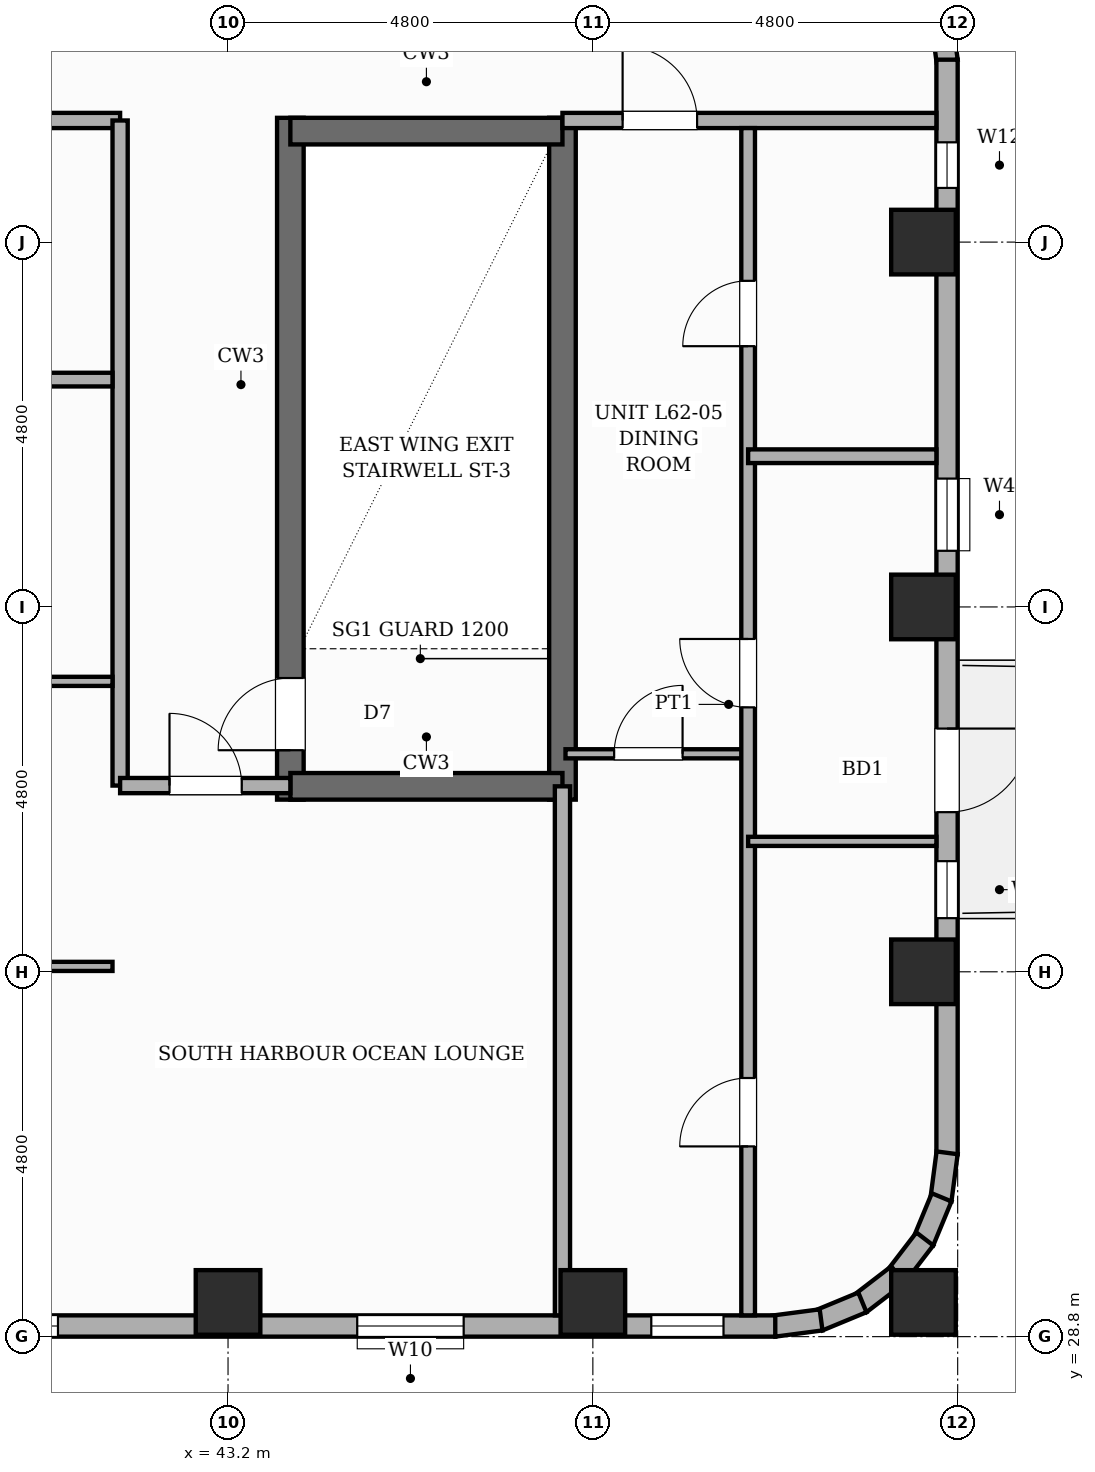
"""IFC4 building model, lengths in metres.
Left out: names, types, materials, properties, quantities, classifications, styles, units other than length and angle.
Written with IfcOpenShell. Run it as: python <this file> out.ifc"""

import sys

from ifc_helpers import new_model, si_unit, direction, frame, frame_2d, origin, origin_2d, place, context, subcontext, project, spatial, rectangle, extrude, element, fill, save


model = new_model("IFC4")
c1 = context("Model", 3, precision=1e-05, world=origin(), true_north=direction((0.0, 1.0)))
c2 = subcontext(c1, "Body", "Model", "MODEL_VIEW")
j1 = project(units=[si_unit("LENGTHUNIT", "METRE"), si_unit("PLANEANGLEUNIT", "RADIAN")], contexts=[c1])
p1 = place(None, origin())
s1 = spatial("IfcSite", under=j1, at=p1, CompositionType="ELEMENT")
p2 = place(p1, origin())
s2 = spatial("IfcBuilding", under=s1, at=p2, CompositionType="ELEMENT")
p3 = place(p2, frame((0.0, 0.0, 236.2)))
s3 = spatial("IfcBuildingStorey", under=s2, at=p3, CompositionType="ELEMENT", Elevation=236.2)
p4 = place(p3, frame((44.02, 35.865, 0.0), z_axis=(0.0, 0.0, 1.0), x_axis=(0.0, 1.0, 0.0)))
e1 = element("IfcWall", 1, at=p4, inside=s3, PredefinedType="SHEAR", context=c2, shape_type="SweptSolid", body=[
    extrude(rectangle(XDim=8.97, YDim=0.35, at=frame_2d((4.485, 0.0))), origin(), (0.0, 0.0, 1.0), 3.6),
])
p5 = place(p4, frame((0.65, 0.0, 0.0)))
e2 = element("IfcOpeningElement", 2, at=p5, cuts=e1, PredefinedType="OPENING", context=c2, shape_type="SweptSolid", body=[
    extrude(rectangle(XDim=0.95, YDim=2.1, at=frame_2d((0.475, 1.05))), frame((0.0, 0.185, 0.0), z_axis=(0.0, -1.0, 0.0), x_axis=(1.0, 0.0, 0.0)), (0.0, 0.0, 1.0), 0.37),
])
p6 = place(p3, frame((47.6, 35.865, 0.0), z_axis=(0.0, 0.0, 1.0), x_axis=(0.0, 1.0, 0.0)))
e3 = element("IfcWall", 3, at=p6, inside=s3, PredefinedType="SHEAR", context=c2, shape_type="SweptSolid", body=[
    extrude(rectangle(XDim=8.97, YDim=0.35, at=frame_2d((4.485, 0.0))), origin(), (0.0, 0.0, 1.0), 3.6),
])
for number, where, z_axis, x_axis in (
    (4, (44.02, 36.04, 0.0), (0.0, 0.0, 1.0), (1.0, 0.0, 0.0)),
    (5, (44.02, 44.66, 0.0), (0.0, 0.0, 1.0), (1.0, 0.0, 0.0)),
):
    element("IfcWall", number, at=place(p3, frame(where, z_axis=z_axis, x_axis=x_axis)), inside=s3, PredefinedType="SHEAR", context=c2, shape_type="SweptSolid", body=[
        extrude(rectangle(XDim=3.58, YDim=0.35, at=frame_2d((1.79, 0.0))), origin(), (0.0, 0.0, 1.0), 3.6),
    ])
for number, where, z_axis, x_axis in (
    (6, (43.2, 29.25, 0.0), (0.0, 0.0, 1.0), (1.0, 0.0, 0.0)),
    (7, (48.0, 29.25, 0.0), (0.0, 0.0, 1.0), (1.0, 0.0, 0.0)),
    (8, (52.35, 29.25, 0.0), (0.0, 0.0, 1.0), (1.0, 0.0, 0.0)),
    (9, (52.35, 33.6, 0.0), (0.0, 0.0, 1.0), (1.0, 0.0, 0.0)),
    (10, (52.35, 38.4, 0.0), (0.0, 0.0, 1.0), (1.0, 0.0, 0.0)),
    (11, (52.35, 43.2, 0.0), (0.0, 0.0, 1.0), (1.0, 0.0, 0.0)),
):
    element("IfcColumn", number, at=place(p3, frame(where, z_axis=z_axis, x_axis=x_axis)), inside=s3, PredefinedType="COLUMN", context=c2, shape_type="SweptSolid", body=[
        extrude(rectangle(XDim=0.85, YDim=0.85, at=origin_2d()), origin(), (0.0, 0.0, 1.0), 3.6),
    ])
p7 = place(p3, frame((52.579, 46.203, 0.0), z_axis=(0.0, 0.0, 1.0), x_axis=(0.130555323746, -0.9914410257, 0.0)))
e12 = element("IfcWall", 12, at=p7, inside=s3, PredefinedType="STANDARD", context=c2, shape_type="SweptSolid", body=[
    extrude(rectangle(XDim=0.626, YDim=0.28, at=frame_2d((0.313, 0.0))), origin(), (0.0, 0.0, 1.0), 2.6),
])
p8 = place(p3, frame((52.66, 45.6, 0.0), z_axis=(0.0, 0.0, 1.0), x_axis=(0.0, -1.0, 0.0)))
e13 = element("IfcWall", 13, at=p8, inside=s3, PredefinedType="STANDARD", context=c2, shape_type="SweptSolid", body=[
    extrude(rectangle(XDim=14.4, YDim=0.28, at=frame_2d((7.2, 0.0))), origin(), (0.0, 0.0, 1.0), 2.6),
])
p9 = place(p8, frame((8.8, 0.0, 0.0)))
e14 = element("IfcOpeningElement", 14, at=p9, cuts=e13, PredefinedType="OPENING", context=c2, shape_type="SweptSolid", body=[
    extrude(rectangle(XDim=1.1, YDim=2.15, at=frame_2d((0.55, 1.075))), frame((0.0, 0.15, 0.0), z_axis=(0.0, -1.0, 0.0), x_axis=(1.0, 0.0, 0.0)), (0.0, 0.0, 1.0), 0.3),
])
p10 = place(p8, frame((10.544, 0.0, 0.45)))
e15 = element("IfcOpeningElement", 15, at=p10, cuts=e13, PredefinedType="OPENING", context=c2, shape_type="SweptSolid", body=[
    extrude(rectangle(XDim=0.75, YDim=1.8, at=frame_2d((0.375, 0.9))), frame((0.0, 0.15, 0.0), z_axis=(0.0, -1.0, 0.0), x_axis=(1.0, 0.0, 0.0)), (0.0, 0.0, 1.0), 0.3),
])
p11 = place(p8, frame((1.087, 0.0, 0.45)))
e16 = element("IfcOpeningElement", 16, at=p11, cuts=e13, PredefinedType="OPENING", context=c2, shape_type="SweptSolid", body=[
    extrude(rectangle(XDim=0.6, YDim=1.8, at=frame_2d((0.3, 0.9))), frame((0.0, 0.15, 0.0), z_axis=(0.0, -1.0, 0.0), x_axis=(1.0, 0.0, 0.0)), (0.0, 0.0, 1.0), 0.3),
])
p12 = place(p8, frame((5.511, 0.0, 0.45)))
e17 = element("IfcOpeningElement", 17, at=p12, cuts=e13, PredefinedType="OPENING", context=c2, shape_type="SweptSolid", body=[
    extrude(rectangle(XDim=0.95, YDim=1.8, at=frame_2d((0.475, 0.9))), frame((0.0, 0.15, 0.0), z_axis=(0.0, -1.0, 0.0), x_axis=(1.0, 0.0, 0.0)), (0.0, 0.0, 1.0), 0.3),
])
p13 = place(p3, frame((52.661, 31.218, 0.0), z_axis=(0.0, 0.0, 1.0), x_axis=(-0.130555323746, -0.9914410257, 0.0)))
e18 = element("IfcWall", 18, at=p13, inside=s3, PredefinedType="STANDARD", context=c2, shape_type="SweptSolid", body=[
    extrude(rectangle(XDim=0.626, YDim=0.28, at=frame_2d((0.313, 0.0))), origin(), (0.0, 0.0, 1.0), 2.6),
])
p14 = place(p3, frame((52.589, 30.632, 0.0), z_axis=(0.0, 0.0, 1.0), x_axis=(-0.382787856107, -0.923836271867, 0.0)))
e19 = element("IfcWall", 19, at=p14, inside=s3, PredefinedType="STANDARD", context=c2, shape_type="SweptSolid", body=[
    extrude(rectangle(XDim=0.626, YDim=0.28, at=frame_2d((0.313, 0.0))), origin(), (0.0, 0.0, 1.0), 2.6),
])
for number, where, z_axis, x_axis in (
    (20, (52.367, 30.085, 0.0), (0.0, 0.0, 1.0), (-0.609, -0.793, 0.0)),
    (21, (52.012, 29.614, 0.0), (0.0, 0.0, 1.0), (-0.793, -0.609, 0.0)),
    (22, (51.546, 29.251, 0.0), (0.0, 0.0, 1.0), (-0.924, -0.383, 0.0)),
):
    element("IfcWall", number, at=place(p3, frame(where, z_axis=z_axis, x_axis=x_axis)), inside=s3, PredefinedType="STANDARD", context=c2, shape_type="SweptSolid", body=[
        extrude(rectangle(XDim=0.626, YDim=0.28, at=frame_2d((0.313, 0.0))), origin(), (0.0, 0.0, 1.0), 2.6),
    ])
p15 = place(p3, frame((51.003, 29.021, 0.0), z_axis=(0.0, 0.0, 1.0), x_axis=(-0.991447664465, -0.130504898859, 0.0)))
e23 = element("IfcWall", 23, at=p15, inside=s3, PredefinedType="STANDARD", context=c2, shape_type="SweptSolid", body=[
    extrude(rectangle(XDim=0.627, YDim=0.28, at=frame_2d((0.313, 0.0))), origin(), (0.0, 0.0, 1.0), 2.6),
])
p16 = place(p3, frame((50.4, 28.94, 0.0), z_axis=(0.0, 0.0, 1.0), x_axis=(-1.0, 0.0, 0.0)))
e24 = element("IfcWall", 24, at=p16, inside=s3, PredefinedType="STANDARD", context=c2, shape_type="SweptSolid", body=[
    extrude(rectangle(XDim=24.0, YDim=0.28, at=frame_2d((12.0, 0.0))), origin(), (0.0, 0.0, 1.0), 2.6),
])
p17 = place(p16, frame((9.438, 0.0, 0.65)))
e25 = element("IfcOpeningElement", 25, at=p17, cuts=e24, PredefinedType="OPENING", context=c2, shape_type="SweptSolid", body=[
    extrude(rectangle(XDim=1.4, YDim=1.1, at=frame_2d((0.7, 0.55))), frame((0.0, 0.15, 0.0), z_axis=(0.0, -1.0, 0.0), x_axis=(1.0, 0.0, 0.0)), (0.0, 0.0, 1.0), 0.3),
])
p18 = place(p16, frame((22.555, 0.0, 0.45)))
e26 = element("IfcOpeningElement", 26, at=p18, cuts=e24, PredefinedType="OPENING", context=c2, shape_type="SweptSolid", body=[
    extrude(rectangle(XDim=0.95, YDim=1.8, at=frame_2d((0.475, 0.9))), frame((0.0, 0.15, 0.0), z_axis=(0.0, -1.0, 0.0), x_axis=(1.0, 0.0, 0.0)), (0.0, 0.0, 1.0), 0.3),
])
p19 = place(p16, frame((4.1, 0.0, 0.65)))
e27 = element("IfcOpeningElement", 27, at=p19, cuts=e24, PredefinedType="OPENING", context=c2, shape_type="SweptSolid", body=[
    extrude(rectangle(XDim=1.4, YDim=1.1, at=frame_2d((0.7, 0.55))), frame((0.0, 0.15, 0.0), z_axis=(0.0, -1.0, 0.0), x_axis=(1.0, 0.0, 0.0)), (0.0, 0.0, 1.0), 0.3),
])
p20 = place(p16, frame((15.138, 0.0, 0.45)))
e28 = element("IfcOpeningElement", 28, at=p20, cuts=e24, PredefinedType="OPENING", context=c2, shape_type="SweptSolid", body=[
    extrude(rectangle(XDim=0.95, YDim=1.8, at=frame_2d((0.475, 0.9))), frame((0.0, 0.15, 0.0), z_axis=(0.0, -1.0, 0.0), x_axis=(1.0, 0.0, 0.0)), (0.0, 0.0, 1.0), 0.3),
])
p21 = place(p16, frame((0.681, 0.0, 0.45)))
e29 = element("IfcOpeningElement", 29, at=p21, cuts=e24, PredefinedType="OPENING", context=c2, shape_type="SweptSolid", body=[
    extrude(rectangle(XDim=0.95, YDim=1.8, at=frame_2d((0.475, 0.9))), frame((0.0, 0.15, 0.0), z_axis=(0.0, -1.0, 0.0), x_axis=(1.0, 0.0, 0.0)), (0.0, 0.0, 1.0), 0.3),
])
p22 = place(p3, frame((25.5, 44.8, 0.0), z_axis=(0.0, 0.0, 1.0), x_axis=(1.0, 0.0, 0.0)))
e30 = element("IfcWall", 30, at=p22, inside=s3, PredefinedType="PARTITIONING", context=c2, shape_type="SweptSolid", body=[
    extrude(rectangle(XDim=16.28, YDim=0.2, at=frame_2d((8.14, 0.0))), origin(), (0.0, 0.0, 1.0), 3.32),
])
p23 = place(p22, frame((0.9, 0.0, 0.0)))
e31 = element("IfcOpeningElement", 31, at=p23, cuts=e30, PredefinedType="OPENING", context=c2, shape_type="SweptSolid", body=[
    extrude(rectangle(XDim=0.95, YDim=2.15, at=frame_2d((0.475, 1.075))), frame((0.0, 0.11, 0.0), z_axis=(0.0, -1.0, 0.0), x_axis=(1.0, 0.0, 0.0)), (0.0, 0.0, 1.0), 0.22),
])
p24 = place(p22, frame((6.014, 0.0, 0.0)))
e32 = element("IfcOpeningElement", 32, at=p24, cuts=e30, PredefinedType="OPENING", context=c2, shape_type="SweptSolid", body=[
    extrude(rectangle(XDim=0.98, YDim=2.18, at=frame_2d((0.49, 1.09))), frame((0.0, 0.11, 0.0), z_axis=(0.0, -1.0, 0.0), x_axis=(1.0, 0.0, 0.0)), (0.0, 0.0, 1.0), 0.22),
])
p25 = place(p3, frame((47.6, 44.8, 0.0), z_axis=(0.0, 0.0, 1.0), x_axis=(1.0, 0.0, 0.0)))
e33 = element("IfcWall", 33, at=p25, inside=s3, PredefinedType="PARTITIONING", context=c2, shape_type="SweptSolid", body=[
    extrude(rectangle(XDim=4.92, YDim=0.2, at=frame_2d((2.46, 0.0))), origin(), (0.0, 0.0, 1.0), 3.32),
])
p26 = place(p25, frame((0.792, 0.0, 0.0)))
e34 = element("IfcOpeningElement", 34, at=p26, cuts=e33, PredefinedType="OPENING", context=c2, shape_type="SweptSolid", body=[
    extrude(rectangle(XDim=0.98, YDim=2.18, at=frame_2d((0.49, 1.09))), frame((0.0, 0.11, 0.0), z_axis=(0.0, -1.0, 0.0), x_axis=(1.0, 0.0, 0.0)), (0.0, 0.0, 1.0), 0.22),
])
p27 = place(p3, frame((41.78, 36.05, 0.0), z_axis=(0.0, 0.0, 1.0), x_axis=(0.0, 1.0, 0.0)))
e35 = element("IfcWall", 35, at=p27, inside=s3, PredefinedType="PARTITIONING", context=c2, shape_type="SweptSolid", body=[
    extrude(rectangle(XDim=8.75, YDim=0.2, at=frame_2d((4.375, 0.0))), origin(), (0.0, 0.0, 1.0), 3.32),
])
p28 = place(p3, frame((41.78, 36.05, 0.0), z_axis=(0.0, 0.0, 1.0), x_axis=(1.0, 0.0, 0.0)))
e36 = element("IfcWall", 36, at=p28, inside=s3, PredefinedType="PARTITIONING", context=c2, shape_type="SweptSolid", body=[
    extrude(rectangle(XDim=2.24, YDim=0.2, at=frame_2d((1.12, 0.0))), origin(), (0.0, 0.0, 1.0), 3.32),
])
p29 = place(p28, frame((0.65, 0.0, 0.0)))
e37 = element("IfcOpeningElement", 37, at=p29, cuts=e36, PredefinedType="OPENING", context=c2, shape_type="SweptSolid", body=[
    extrude(rectangle(XDim=0.95, YDim=2.15, at=frame_2d((0.475, 1.075))), frame((0.0, 0.11, 0.0), z_axis=(0.0, -1.0, 0.0), x_axis=(1.0, 0.0, 0.0)), (0.0, 0.0, 1.0), 0.22),
])
for number, where, z_axis, x_axis in (
    (38, (35.528, 33.671, 0.0), (0.0, 0.0, 1.0), (1.0, 0.0, 0.0)),
    (39, (35.528, 37.421, 0.0), (0.0, 0.0, 1.0), (1.0, 0.0, 0.0)),
):
    element("IfcWall", number, at=place(p3, frame(where, z_axis=z_axis, x_axis=x_axis)), inside=s3, PredefinedType="PARTITIONING", context=c2, shape_type="SweptSolid", body=[
        extrude(rectangle(XDim=6.152, YDim=0.12, at=frame_2d((3.076, 0.0))), origin(), (0.0, 0.0, 1.0), 3.32),
    ])
p30 = place(p3, frame((35.528, 41.391, 0.0), z_axis=(0.0, 0.0, 1.0), x_axis=(1.0, 0.0, 0.0)))
e40 = element("IfcWall", 40, at=p30, inside=s3, PredefinedType="PLUMBINGWALL", context=c2, shape_type="SweptSolid", body=[
    extrude(rectangle(XDim=6.152, YDim=0.18, at=frame_2d((3.076, 0.0))), origin(), (0.0, 0.0, 1.0), 3.32),
])
p31 = place(p3, frame((47.6, 29.08, 0.0), z_axis=(0.0, 0.0, 1.0), x_axis=(0.0, 1.0, 0.0)))
e41 = element("IfcWall", 41, at=p31, inside=s3, PredefinedType="SOLIDWALL", context=c2, shape_type="SweptSolid", body=[
    extrude(rectangle(XDim=6.96, YDim=0.2, at=frame_2d((3.48, 0.0))), origin(), (0.0, 0.0, 1.0), 3.32),
])
p32 = place(p3, frame((47.64, 36.468, 0.0), z_axis=(0.0, 0.0, 1.0), x_axis=(1.0, 0.0, 0.0)))
e42 = element("IfcWall", 42, at=p32, inside=s3, PredefinedType="PARTITIONING", context=c2, shape_type="SweptSolid", body=[
    extrude(rectangle(XDim=2.403, YDim=0.12, at=frame_2d((1.202, 0.0))), origin(), (0.0, 0.0, 1.0), 3.32),
])
p33 = place(p32, frame((0.64, 0.0, 0.0)))
e43 = element("IfcOpeningElement", 43, at=p33, cuts=e42, PredefinedType="OPENING", context=c2, shape_type="SweptSolid", body=[
    extrude(rectangle(XDim=0.9, YDim=2.15, at=frame_2d((0.45, 1.075))), frame((0.0, 0.07, 0.0), z_axis=(0.0, -1.0, 0.0), x_axis=(1.0, 0.0, 0.0)), (0.0, 0.0, 1.0), 0.14),
])
p34 = place(p3, frame((50.043, 29.08, 0.0), z_axis=(0.0, 0.0, 1.0), x_axis=(0.0, 1.0, 0.0)))
e44 = element("IfcWall", 44, at=p34, inside=s3, PredefinedType="PLUMBINGWALL", context=c2, shape_type="SweptSolid", body=[
    extrude(rectangle(XDim=15.62, YDim=0.18, at=frame_2d((7.81, 0.0))), origin(), (0.0, 0.0, 1.0), 3.32),
])
p35 = place(p34, frame((2.223, 0.0, 0.0)))
e45 = element("IfcOpeningElement", 45, at=p35, cuts=e44, PredefinedType="OPENING", context=c2, shape_type="SweptSolid", body=[
    extrude(rectangle(XDim=0.9, YDim=2.15, at=frame_2d((0.45, 1.075))), frame((0.0, 0.1, 0.0), z_axis=(0.0, -1.0, 0.0), x_axis=(1.0, 0.0, 0.0)), (0.0, 0.0, 1.0), 0.2),
])
p36 = place(p34, frame((7.999, 0.0, 0.0)))
e46 = element("IfcOpeningElement", 46, at=p36, cuts=e44, PredefinedType="OPENING", context=c2, shape_type="SweptSolid", body=[
    extrude(rectangle(XDim=0.9, YDim=2.15, at=frame_2d((0.45, 1.075))), frame((0.0, 0.1, 0.0), z_axis=(0.0, -1.0, 0.0), x_axis=(1.0, 0.0, 0.0)), (0.0, 0.0, 1.0), 0.2),
])
p37 = place(p34, frame((12.75, 0.0, 0.0)))
e47 = element("IfcOpeningElement", 47, at=p37, cuts=e44, PredefinedType="OPENING", context=c2, shape_type="SweptSolid", body=[
    extrude(rectangle(XDim=0.86, YDim=2.1, at=frame_2d((0.43, 1.05))), frame((0.0, 0.1, 0.0), z_axis=(0.0, -1.0, 0.0), x_axis=(1.0, 0.0, 0.0)), (0.0, 0.0, 1.0), 0.2),
])
p38 = place(p3, frame((50.043, 35.316, 0.0), z_axis=(0.0, 0.0, 1.0), x_axis=(1.0, 0.0, 0.0)))
e48 = element("IfcWall", 48, at=p38, inside=s3, PredefinedType="PARTITIONING", context=c2, shape_type="SweptSolid", body=[
    extrude(rectangle(XDim=2.477, YDim=0.12, at=frame_2d((1.239, 0.0))), origin(), (0.0, 0.0, 1.0), 3.32),
])
p39 = place(p3, frame((50.043, 40.383, 0.0), z_axis=(0.0, 0.0, 1.0), x_axis=(1.0, 0.0, 0.0)))
e49 = element("IfcWall", 49, at=p39, inside=s3, PredefinedType="PLUMBINGWALL", context=c2, shape_type="SweptSolid", body=[
    extrude(rectangle(XDim=2.477, YDim=0.18, at=frame_2d((1.239, 0.0))), origin(), (0.0, 0.0, 1.0), 3.32),
])
p40 = place(p9, origin())
e50 = element("IfcDoor", 50, at=p40, inside=s3, OperationType="SINGLE_SWING_LEFT", PredefinedType="DOOR", context=c2, shape_type="SweptSolid", body=[
    extrude(rectangle(XDim=1.1, YDim=2.15, at=frame_2d((0.55, 1.075))), frame((0.0, 0.025, 0.0), z_axis=(0.0, -1.0, 0.0), x_axis=(1.0, 0.0, 0.0)), (0.0, 0.0, 1.0), 0.05),
])
fill(e14, e50)
p41 = place(p10, origin())
e51 = element("IfcWindow", 51, at=p41, inside=s3, PartitioningType="SINGLE_PANEL", PredefinedType="WINDOW", context=c2, shape_type="SweptSolid", body=[
    extrude(rectangle(XDim=0.75, YDim=1.8, at=frame_2d((0.375, 0.9))), frame((0.0, 0.03, 0.0), z_axis=(0.0, -1.0, 0.0), x_axis=(1.0, 0.0, 0.0)), (0.0, 0.0, 1.0), 0.06),
])
fill(e15, e51)
p42 = place(p11, origin())
e52 = element("IfcWindow", 52, at=p42, inside=s3, PartitioningType="SINGLE_PANEL", PredefinedType="WINDOW", context=c2, shape_type="SweptSolid", body=[
    extrude(rectangle(XDim=0.6, YDim=1.8, at=frame_2d((0.3, 0.9))), frame((0.0, 0.03, 0.0), z_axis=(0.0, -1.0, 0.0), x_axis=(1.0, 0.0, 0.0)), (0.0, 0.0, 1.0), 0.06),
])
fill(e16, e52)
p43 = place(p12, origin())
e53 = element("IfcWindow", 53, at=p43, inside=s3, PartitioningType="SINGLE_PANEL", PredefinedType="WINDOW", context=c2, shape_type="SweptSolid", body=[
    extrude(rectangle(XDim=0.95, YDim=1.8, at=frame_2d((0.475, 0.9))), frame((0.0, 0.03, 0.0), z_axis=(0.0, -1.0, 0.0), x_axis=(1.0, 0.0, 0.0)), (0.0, 0.0, 1.0), 0.06),
])
fill(e17, e53)
p44 = place(p17, origin())
e54 = element("IfcWindow", 54, at=p44, inside=s3, PartitioningType="SINGLE_PANEL", PredefinedType="WINDOW", context=c2, shape_type="SweptSolid", body=[
    extrude(rectangle(XDim=1.4, YDim=1.1, at=frame_2d((0.7, 0.55))), frame((0.0, 0.03, 0.0), z_axis=(0.0, -1.0, 0.0), x_axis=(1.0, 0.0, 0.0)), (0.0, 0.0, 1.0), 0.06),
])
fill(e25, e54)
p45 = place(p19, origin())
e55 = element("IfcWindow", 55, at=p45, inside=s3, PartitioningType="SINGLE_PANEL", PredefinedType="WINDOW", context=c2, shape_type="SweptSolid", body=[
    extrude(rectangle(XDim=1.4, YDim=1.1, at=frame_2d((0.7, 0.55))), frame((0.0, 0.03, 0.0), z_axis=(0.0, -1.0, 0.0), x_axis=(1.0, 0.0, 0.0)), (0.0, 0.0, 1.0), 0.06),
])
fill(e27, e55)
p46 = place(p21, origin())
e56 = element("IfcWindow", 56, at=p46, inside=s3, PartitioningType="SINGLE_PANEL", PredefinedType="WINDOW", context=c2, shape_type="SweptSolid", body=[
    extrude(rectangle(XDim=0.95, YDim=1.8, at=frame_2d((0.475, 0.9))), frame((0.0, 0.03, 0.0), z_axis=(0.0, -1.0, 0.0), x_axis=(1.0, 0.0, 0.0)), (0.0, 0.0, 1.0), 0.06),
])
fill(e29, e56)
p47 = place(p5, origin())
e57 = element("IfcDoor", 57, at=p47, inside=s3, OperationType="SINGLE_SWING_LEFT", PredefinedType="DOOR", context=c2, shape_type="SweptSolid", body=[
    extrude(rectangle(XDim=0.95, YDim=2.1, at=frame_2d((0.475, 1.05))), frame((0.0, 0.025, 0.0), z_axis=(0.0, -1.0, 0.0), x_axis=(1.0, 0.0, 0.0)), (0.0, 0.0, 1.0), 0.05),
])
fill(e2, e57)
p48 = place(p29, origin())
e58 = element("IfcDoor", 58, at=p48, inside=s3, OperationType="SINGLE_SWING_LEFT", PredefinedType="DOOR", context=c2, shape_type="SweptSolid", body=[
    extrude(rectangle(XDim=0.95, YDim=2.15, at=frame_2d((0.475, 1.075))), frame((0.0, 0.025, 0.0), z_axis=(0.0, -1.0, 0.0), x_axis=(1.0, 0.0, 0.0)), (0.0, 0.0, 1.0), 0.05),
])
fill(e37, e58)
p49 = place(p26, origin())
e59 = element("IfcDoor", 59, at=p49, inside=s3, OperationType="SINGLE_SWING_LEFT", PredefinedType="DOOR", context=c2, shape_type="SweptSolid", body=[
    extrude(rectangle(XDim=0.98, YDim=2.18, at=frame_2d((0.49, 1.09))), frame((0.0, 0.025, 0.0), z_axis=(0.0, -1.0, 0.0), x_axis=(1.0, 0.0, 0.0)), (0.0, 0.0, 1.0), 0.05),
])
fill(e34, e59)
p50 = place(p33, origin())
e60 = element("IfcDoor", 60, at=p50, inside=s3, OperationType="SINGLE_SWING_RIGHT", PredefinedType="DOOR", context=c2, shape_type="SweptSolid", body=[
    extrude(rectangle(XDim=0.9, YDim=2.15, at=frame_2d((0.45, 1.075))), frame((0.0, 0.025, 0.0), z_axis=(0.0, -1.0, 0.0), x_axis=(1.0, 0.0, 0.0)), (0.0, 0.0, 1.0), 0.05),
])
fill(e43, e60)
p51 = place(p35, origin())
e61 = element("IfcDoor", 61, at=p51, inside=s3, OperationType="SINGLE_SWING_LEFT", PredefinedType="DOOR", context=c2, shape_type="SweptSolid", body=[
    extrude(rectangle(XDim=0.9, YDim=2.15, at=frame_2d((0.45, 1.075))), frame((0.0, 0.025, 0.0), z_axis=(0.0, -1.0, 0.0), x_axis=(1.0, 0.0, 0.0)), (0.0, 0.0, 1.0), 0.05),
])
fill(e45, e61)
p52 = place(p36, origin())
e62 = element("IfcDoor", 62, at=p52, inside=s3, OperationType="SINGLE_SWING_RIGHT", PredefinedType="DOOR", context=c2, shape_type="SweptSolid", body=[
    extrude(rectangle(XDim=0.9, YDim=2.15, at=frame_2d((0.45, 1.075))), frame((0.0, 0.025, 0.0), z_axis=(0.0, -1.0, 0.0), x_axis=(1.0, 0.0, 0.0)), (0.0, 0.0, 1.0), 0.05),
])
fill(e46, e62)
p53 = place(p37, origin())
e63 = element("IfcDoor", 63, at=p53, inside=s3, OperationType="SINGLE_SWING_LEFT", PredefinedType="DOOR", context=c2, shape_type="SweptSolid", body=[
    extrude(rectangle(XDim=0.86, YDim=2.1, at=frame_2d((0.43, 1.05))), frame((0.0, 0.025, 0.0), z_axis=(0.0, -1.0, 0.0), x_axis=(1.0, 0.0, 0.0)), (0.0, 0.0, 1.0), 0.05),
])
fill(e47, e63)
save(model, sys.argv[1])
